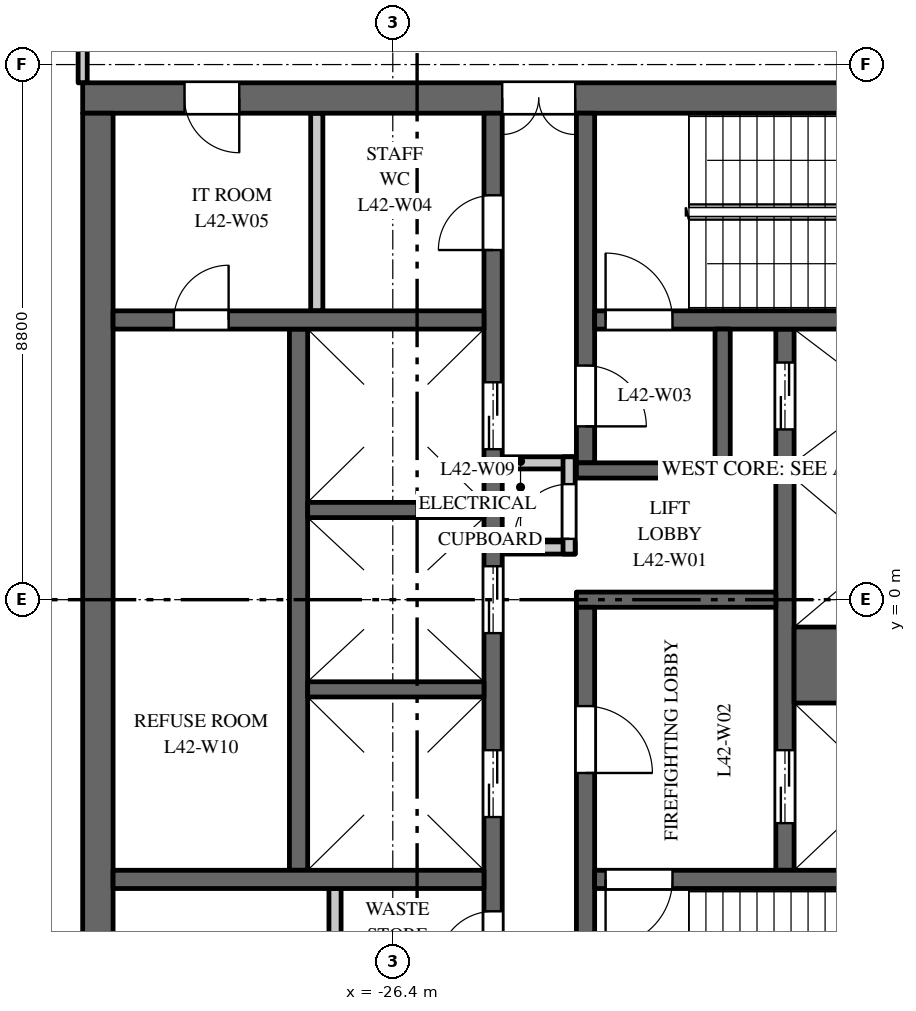
"""IFC4 building model, lengths in metres.
Left out: names, types, materials, properties, quantities, classifications, styles, units other than length and angle.
Written with IfcOpenShell. Run it as: python <this file> out.ifc"""

import sys

from ifc_helpers import new_model, si_unit, direction, frame, frame_2d, origin, place, context, subcontext, project, spatial, rectangle, extrude, element, fill, save


model = new_model("IFC4")
c1 = context("Model", 3, precision=1e-05, world=origin(), true_north=direction((0.0, 1.0)))
c2 = subcontext(c1, "Body", "Model", "MODEL_VIEW")
j1 = project(units=[si_unit("LENGTHUNIT", "METRE"), si_unit("PLANEANGLEUNIT", "RADIAN")], contexts=[c1])
p1 = place(None, origin())
s1 = spatial("IfcSite", under=j1, at=p1, CompositionType="ELEMENT")
p2 = place(p1, origin())
s2 = spatial("IfcBuilding", under=s1, at=p2, CompositionType="ELEMENT")
p3 = place(p2, frame((0.0, 0.0, 182.0)))
s3 = spatial("IfcBuildingStorey", under=s2, at=p3, CompositionType="ELEMENT", Elevation=182.0)
p4 = place(p3, frame((-16.5, 8.25, 0.0), z_axis=(0.0, 0.0, 1.0), x_axis=(-1.0, 0.0, 0.0)))
e1 = element("IfcWall", 1, at=p4, inside=s3, PredefinedType="SHEAR", context=c2, shape_type="SweptSolid", body=[
    extrude(rectangle(XDim=15.0, YDim=0.5, at=frame_2d((7.5, 0.0))), origin(), (0.0, 0.0, 1.0), 3.7),
])
p5 = place(p4, frame((6.9, 0.0, 0.0)))
e2 = element("IfcOpeningElement", 2, at=p5, cuts=e1, PredefinedType="OPENING", context=c2, shape_type="SweptSolid", body=[
    extrude(rectangle(XDim=1.2, YDim=2.1, at=frame_2d((0.6, 1.05))), frame((0.0, 0.26, 0.0), z_axis=(0.0, -1.0, 0.0), x_axis=(1.0, 0.0, 0.0)), (0.0, 0.0, 1.0), 0.52),
])
p6 = place(p4, frame((12.425, 0.0, 0.0)))
e3 = element("IfcOpeningElement", 3, at=p6, cuts=e1, PredefinedType="OPENING", context=c2, shape_type="SweptSolid", body=[
    extrude(rectangle(XDim=0.9, YDim=2.1, at=frame_2d((0.45, 1.05))), frame((0.0, 0.26, 0.0), z_axis=(0.0, -1.0, 0.0), x_axis=(1.0, 0.0, 0.0)), (0.0, 0.0, 1.0), 0.52),
])
p7 = place(p3, frame((-27.95, -4.45, 0.0), z_axis=(0.0, 0.0, 1.0), x_axis=(0.0, 1.0, 0.0)))
e4 = element("IfcWall", 4, at=p7, inside=s3, PredefinedType="SHEAR", context=c2, shape_type="SweptSolid", body=[
    extrude(rectangle(XDim=8.9, YDim=0.3, at=frame_2d((4.45, 0.0))), origin(), (0.0, 0.0, 1.0), 3.7),
])
p8 = place(p3, frame((-19.95, -4.45, 0.0), z_axis=(0.0, 0.0, 1.0), x_axis=(0.0, 1.0, 0.0)))
e5 = element("IfcWall", 5, at=p8, inside=s3, PredefinedType="SHEAR", context=c2, shape_type="SweptSolid", body=[
    extrude(rectangle(XDim=8.9, YDim=0.3, at=frame_2d((4.45, 0.0))), origin(), (0.0, 0.0, 1.0), 3.7),
])
p9 = place(p8, frame((0.775, 0.0, 0.0)))
e6 = element("IfcOpeningElement", 6, at=p9, cuts=e5, PredefinedType="OPENING", context=c2, shape_type="SweptSolid", body=[
    extrude(rectangle(XDim=1.2, YDim=2.1, at=frame_2d((0.6, 1.05))), frame((0.0, 0.16, 0.0), z_axis=(0.0, -1.0, 0.0), x_axis=(1.0, 0.0, 0.0)), (0.0, 0.0, 1.0), 0.32),
])
p10 = place(p8, frame((7.25, 0.0, 0.0)))
e7 = element("IfcOpeningElement", 7, at=p10, cuts=e5, PredefinedType="OPENING", context=c2, shape_type="SweptSolid", body=[
    extrude(rectangle(XDim=1.1, YDim=2.1, at=frame_2d((0.55, 1.05))), frame((0.0, 0.16, 0.0), z_axis=(0.0, -1.0, 0.0), x_axis=(1.0, 0.0, 0.0)), (0.0, 0.0, 1.0), 0.32),
])
p11 = place(p3, frame((-24.75, -8.0, 0.0), z_axis=(0.0, 0.0, 1.0), x_axis=(0.0, 1.0, 0.0)))
e8 = element("IfcWall", 8, at=p11, inside=s3, PredefinedType="SHEAR", context=c2, shape_type="SweptSolid", body=[
    extrude(rectangle(XDim=16.0, YDim=0.3, at=frame_2d((8.0, 0.0))), origin(), (0.0, 0.0, 1.0), 3.7),
])
p12 = place(p11, frame((4.425, 0.0, 0.0)))
e9 = element("IfcOpeningElement", 9, at=p12, cuts=e8, PredefinedType="OPENING", context=c2, shape_type="SweptSolid", body=[
    extrude(rectangle(XDim=1.1, YDim=2.1, at=frame_2d((0.55, 1.05))), frame((0.0, 0.16, 0.0), z_axis=(0.0, -1.0, 0.0), x_axis=(1.0, 0.0, 0.0)), (0.0, 0.0, 1.0), 0.32),
])
p13 = place(p11, frame((7.45, 0.0, 0.0)))
e10 = element("IfcOpeningElement", 10, at=p13, cuts=e8, PredefinedType="OPENING", context=c2, shape_type="SweptSolid", body=[
    extrude(rectangle(XDim=1.1, YDim=2.1, at=frame_2d((0.55, 1.05))), frame((0.0, 0.16, 0.0), z_axis=(0.0, -1.0, 0.0), x_axis=(1.0, 0.0, 0.0)), (0.0, 0.0, 1.0), 0.32),
])
p14 = place(p11, frame((10.475, 0.0, 0.0)))
e11 = element("IfcOpeningElement", 11, at=p14, cuts=e8, PredefinedType="OPENING", context=c2, shape_type="SweptSolid", body=[
    extrude(rectangle(XDim=1.1, YDim=2.1, at=frame_2d((0.55, 1.05))), frame((0.0, 0.16, 0.0), z_axis=(0.0, -1.0, 0.0), x_axis=(1.0, 0.0, 0.0)), (0.0, 0.0, 1.0), 0.32),
])
p15 = place(p11, frame((13.75, 0.0, 0.0)))
e12 = element("IfcOpeningElement", 12, at=p15, cuts=e8, PredefinedType="OPENING", context=c2, shape_type="SweptSolid", body=[
    extrude(rectangle(XDim=0.9, YDim=2.1, at=frame_2d((0.45, 1.05))), frame((0.0, 0.16, 0.0), z_axis=(0.0, -1.0, 0.0), x_axis=(1.0, 0.0, 0.0)), (0.0, 0.0, 1.0), 0.32),
])
p16 = place(p11, frame((1.975, 0.0, 0.0)))
e13 = element("IfcOpeningElement", 13, at=p16, cuts=e8, PredefinedType="OPENING", context=c2, shape_type="SweptSolid", body=[
    extrude(rectangle(XDim=0.9, YDim=2.1, at=frame_2d((0.45, 1.05))), frame((0.0, 0.16, 0.0), z_axis=(0.0, -1.0, 0.0), x_axis=(1.0, 0.0, 0.0)), (0.0, 0.0, 1.0), 0.32),
])
p17 = place(p11, frame((0.35, 0.0, 0.0)))
e14 = element("IfcOpeningElement", 14, at=p17, cuts=e8, PredefinedType="OPENING", context=c2, shape_type="SweptSolid", body=[
    extrude(rectangle(XDim=0.9, YDim=2.1, at=frame_2d((0.45, 1.05))), frame((0.0, 0.16, 0.0), z_axis=(0.0, -1.0, 0.0), x_axis=(1.0, 0.0, 0.0)), (0.0, 0.0, 1.0), 0.32),
])
p18 = place(p3, frame((-20.1, 0.0, 0.0), z_axis=(0.0, 0.0, 1.0), x_axis=(-1.0, 0.0, 0.0)))
e15 = element("IfcWall", 15, at=p18, inside=s3, PredefinedType="SHEAR", context=c2, shape_type="SweptSolid", body=[
    extrude(rectangle(XDim=3.28, YDim=0.25, at=frame_2d((1.64, 0.0))), origin(), (0.0, 0.0, 1.0), 3.7),
])
for number, where, z_axis, x_axis in (
    (16, (-23.4, 0.85, 0.0), (0.0, 0.0, 1.0), (-1.0, 0.0, 0.0)),
    (17, (-23.4, 2.25, 0.0), (0.0, 0.0, 1.0), (-1.0, 0.0, 0.0)),
):
    element("IfcWall", number, at=place(p3, frame(where, z_axis=z_axis, x_axis=x_axis)), inside=s3, PredefinedType="PARTITIONING", context=c2, shape_type="SweptSolid", body=[
        extrude(rectangle(XDim=1.2, YDim=0.2, at=frame_2d((0.6, 0.0))), origin(), (0.0, 0.0, 1.0), 3.7),
    ])
p19 = place(p3, frame((-23.5, 0.75, 0.0), z_axis=(0.0, 0.0, 1.0), x_axis=(0.0, 1.0, 0.0)))
e18 = element("IfcWall", 18, at=p19, inside=s3, PredefinedType="PARTITIONING", context=c2, shape_type="SweptSolid", body=[
    extrude(rectangle(XDim=1.6, YDim=0.2, at=frame_2d((0.8, 0.0))), origin(), (0.0, 0.0, 1.0), 3.7),
])
p20 = place(p19, frame((0.25, 0.0, 0.0)))
e19 = element("IfcOpeningElement", 19, at=p20, cuts=e18, PredefinedType="OPENING", context=c2, shape_type="SweptSolid", body=[
    extrude(rectangle(XDim=0.9, YDim=2.1, at=frame_2d((0.45, 1.05))), frame((0.0, 0.11, 0.0), z_axis=(0.0, -1.0, 0.0), x_axis=(1.0, 0.0, 0.0)), (0.0, 0.0, 1.0), 0.22),
])
p21 = place(p3, frame((-31.25, -8.0, 0.0), z_axis=(0.0, 0.0, 1.0), x_axis=(0.0, 1.0, 0.0)))
e20 = element("IfcWall", 20, at=p21, inside=s3, PredefinedType="SHEAR", context=c2, shape_type="SweptSolid", body=[
    extrude(rectangle(XDim=16.0, YDim=0.5, at=frame_2d((8.0, 0.0))), origin(), (0.0, 0.0, 1.0), 3.7),
])
p22 = place(p3, frame((-24.9, 4.6, 0.0), z_axis=(0.0, 0.0, 1.0), x_axis=(-1.0, 0.0, 0.0)))
e21 = element("IfcWall", 21, at=p22, inside=s3, PredefinedType="SHEAR", context=c2, shape_type="SweptSolid", body=[
    extrude(rectangle(XDim=6.1, YDim=0.3, at=frame_2d((3.05, 0.0))), origin(), (0.0, 0.0, 1.0), 3.7),
])
p23 = place(p22, frame((4.2, 0.0, 0.0)))
e22 = element("IfcOpeningElement", 22, at=p23, cuts=e21, PredefinedType="OPENING", context=c2, shape_type="SweptSolid", body=[
    extrude(rectangle(XDim=0.9, YDim=2.1, at=frame_2d((0.45, 1.05))), frame((0.0, 0.16, 0.0), z_axis=(0.0, -1.0, 0.0), x_axis=(1.0, 0.0, 0.0)), (0.0, 0.0, 1.0), 0.32),
])
for number, where, z_axis, x_axis in (
    (23, (-27.65, 4.75, 0.0), (0.0, 0.0, 1.0), (0.0, 1.0, 0.0)),
    (24, (-27.35, -8.0, 0.0), (0.0, 0.0, 1.0), (0.0, 1.0, 0.0)),
):
    element("IfcWall", number, at=place(p3, frame(where, z_axis=z_axis, x_axis=x_axis)), inside=s3, PredefinedType="PARTITIONING", context=c2, shape_type="SweptSolid", body=[
        extrude(rectangle(XDim=3.25, YDim=0.2, at=frame_2d((1.625, 0.0))), origin(), (0.0, 0.0, 1.0), 3.7),
    ])
p24 = place(p3, frame((-24.9, -4.6, 0.0), z_axis=(0.0, 0.0, 1.0), x_axis=(-1.0, 0.0, 0.0)))
e25 = element("IfcWall", 25, at=p24, inside=s3, PredefinedType="SHEAR", context=c2, shape_type="SweptSolid", body=[
    extrude(rectangle(XDim=6.1, YDim=0.3, at=frame_2d((3.05, 0.0))), origin(), (0.0, 0.0, 1.0), 3.7),
])
p25 = place(p3, frame((-16.9, -1.075, 0.0), z_axis=(0.0, 0.0, 1.0), x_axis=(-1.0, 0.0, 0.0)))
e26 = element("IfcWall", 26, at=p25, inside=s3, PredefinedType="SHEAR", context=c2, shape_type="SweptSolid", body=[
    extrude(rectangle(XDim=2.9, YDim=1.25, at=frame_2d((1.45, 0.0))), origin(), (0.0, 0.0, 1.0), 3.7),
])
for number, where, z_axis, x_axis in (
    (27, (-16.9, 2.125, 0.0), (0.0, 0.0, 1.0), (-1.0, 0.0, 0.0)),
    (28, (-24.9, -1.475, 0.0), (0.0, 0.0, 1.0), (-1.0, 0.0, 0.0)),
    (29, (-24.9, 1.475, 0.0), (0.0, 0.0, 1.0), (-1.0, 0.0, 0.0)),
):
    element("IfcWall", number, at=place(p3, frame(where, z_axis=z_axis, x_axis=x_axis)), inside=s3, PredefinedType="SHEAR", context=c2, shape_type="SweptSolid", body=[
        extrude(rectangle(XDim=2.9, YDim=0.25, at=frame_2d((1.45, 0.0))), origin(), (0.0, 0.0, 1.0), 3.7),
    ])
p26 = place(p3, frame((-23.23, 2.25, 0.0), z_axis=(0.0, 0.0, 1.0), x_axis=(0.0, 1.0, 0.0)))
e30 = element("IfcWall", 30, at=p26, inside=s3, PredefinedType="SHEAR", context=c2, shape_type="SweptSolid", body=[
    extrude(rectangle(XDim=5.75, YDim=0.3, at=frame_2d((2.875, 0.0))), origin(), (0.0, 0.0, 1.0), 3.7),
])
p27 = place(p26, frame((0.6, 0.0, 0.0)))
e31 = element("IfcOpeningElement", 31, at=p27, cuts=e30, PredefinedType="OPENING", context=c2, shape_type="SweptSolid", body=[
    extrude(rectangle(XDim=1.0, YDim=2.1, at=frame_2d((0.5, 1.05))), frame((0.0, 0.16, 0.0), z_axis=(0.0, -1.0, 0.0), x_axis=(1.0, 0.0, 0.0)), (0.0, 0.0, 1.0), 0.32),
])
p28 = place(p3, frame((-23.23, -8.0, 0.0), z_axis=(0.0, 0.0, 1.0), x_axis=(0.0, 1.0, 0.0)))
e32 = element("IfcWall", 32, at=p28, inside=s3, PredefinedType="SHEAR", context=c2, shape_type="SweptSolid", body=[
    extrude(rectangle(XDim=7.875, YDim=0.3, at=frame_2d((3.938, 0.0))), origin(), (0.0, 0.0, 1.0), 3.7),
])
p29 = place(p28, frame((5.15, 0.0, 0.0)))
e33 = element("IfcOpeningElement", 33, at=p29, cuts=e32, PredefinedType="OPENING", context=c2, shape_type="SweptSolid", body=[
    extrude(rectangle(XDim=1.1, YDim=2.1, at=frame_2d((0.55, 1.05))), frame((0.0, 0.16, 0.0), z_axis=(0.0, -1.0, 0.0), x_axis=(1.0, 0.0, 0.0)), (0.0, 0.0, 1.0), 0.32),
])
p30 = place(p3, frame((-16.9, 4.6, 0.0), z_axis=(0.0, 0.0, 1.0), x_axis=(-1.0, 0.0, 0.0)))
e34 = element("IfcWall", 34, at=p30, inside=s3, PredefinedType="SHEAR", context=c2, shape_type="SweptSolid", body=[
    extrude(rectangle(XDim=6.18, YDim=0.3, at=frame_2d((3.09, 0.0))), origin(), (0.0, 0.0, 1.0), 3.7),
])
p31 = place(p30, frame((4.9, 0.0, 0.0)))
e35 = element("IfcOpeningElement", 35, at=p31, cuts=e34, PredefinedType="OPENING", context=c2, shape_type="SweptSolid", body=[
    extrude(rectangle(XDim=1.1, YDim=2.1, at=frame_2d((0.55, 1.05))), frame((0.0, 0.16, 0.0), z_axis=(0.0, -1.0, 0.0), x_axis=(1.0, 0.0, 0.0)), (0.0, 0.0, 1.0), 0.32),
])
p32 = place(p3, frame((-16.9, -4.6, 0.0), z_axis=(0.0, 0.0, 1.0), x_axis=(-1.0, 0.0, 0.0)))
e36 = element("IfcWall", 36, at=p32, inside=s3, PredefinedType="SHEAR", context=c2, shape_type="SweptSolid", body=[
    extrude(rectangle(XDim=6.18, YDim=0.3, at=frame_2d((3.09, 0.0))), origin(), (0.0, 0.0, 1.0), 3.7),
])
p33 = place(p32, frame((4.9, 0.0, 0.0)))
e37 = element("IfcOpeningElement", 37, at=p33, cuts=e36, PredefinedType="OPENING", context=c2, shape_type="SweptSolid", body=[
    extrude(rectangle(XDim=1.1, YDim=2.1, at=frame_2d((0.55, 1.05))), frame((0.0, 0.16, 0.0), z_axis=(0.0, -1.0, 0.0), x_axis=(1.0, 0.0, 0.0)), (0.0, 0.0, 1.0), 0.32),
])
p34 = place(p3, frame((-20.85, 2.125, 0.0), z_axis=(0.0, 0.0, 1.0), x_axis=(-1.0, 0.0, 0.0)))
e38 = element("IfcWall", 38, at=p34, inside=s3, PredefinedType="SHEAR", context=c2, shape_type="SweptSolid", body=[
    extrude(rectangle(XDim=2.53, YDim=0.25, at=frame_2d((1.265, 0.0))), origin(), (0.0, 0.0, 1.0), 3.7),
])
p35 = place(p3, frame((-20.975, 2.25, 0.0), z_axis=(0.0, 0.0, 1.0), x_axis=(0.0, 1.0, 0.0)))
e39 = element("IfcWall", 39, at=p35, inside=s3, PredefinedType="SHEAR", context=c2, shape_type="SweptSolid", body=[
    extrude(rectangle(XDim=2.2, YDim=0.25, at=frame_2d((1.1, 0.0))), origin(), (0.0, 0.0, 1.0), 3.7),
])
p36 = place(p3, frame((-31.5, 8.5, 0.0), z_axis=(0.0, 0.0, 1.0), x_axis=(0.0, 1.0, 0.0)))
e40 = element("IfcWall", 40, at=p36, inside=s3, PredefinedType="PARTITIONING", context=c2, shape_type="SweptSolid", body=[
    extrude(rectangle(XDim=2.2, YDim=0.15, at=frame_2d((1.1, 0.0))), origin(), (0.0, 0.0, 1.0), 3.7),
])
p37 = place(p9, origin())
e41 = element("IfcDoor", 41, at=p37, inside=s3, OperationType="DOUBLE_DOOR_SLIDING", PredefinedType="DOOR", context=c2, shape_type="SweptSolid", body=[
    extrude(rectangle(XDim=1.2, YDim=2.1, at=frame_2d((0.6, 1.05))), frame((0.0, 0.025, 0.0), z_axis=(0.0, -1.0, 0.0), x_axis=(1.0, 0.0, 0.0)), (0.0, 0.0, 1.0), 0.05),
])
fill(e6, e41)
p38 = place(p10, origin())
e42 = element("IfcDoor", 42, at=p38, inside=s3, OperationType="DOUBLE_DOOR_SLIDING", PredefinedType="DOOR", context=c2, shape_type="SweptSolid", body=[
    extrude(rectangle(XDim=1.1, YDim=2.1, at=frame_2d((0.55, 1.05))), frame((0.0, 0.025, 0.0), z_axis=(0.0, -1.0, 0.0), x_axis=(1.0, 0.0, 0.0)), (0.0, 0.0, 1.0), 0.05),
])
fill(e7, e42)
p39 = place(p12, origin())
e43 = element("IfcDoor", 43, at=p39, inside=s3, OperationType="DOUBLE_DOOR_SLIDING", PredefinedType="DOOR", context=c2, shape_type="SweptSolid", body=[
    extrude(rectangle(XDim=1.1, YDim=2.1, at=frame_2d((0.55, 1.05))), frame((0.0, 0.025, 0.0), z_axis=(0.0, -1.0, 0.0), x_axis=(1.0, 0.0, 0.0)), (0.0, 0.0, 1.0), 0.05),
])
fill(e9, e43)
p40 = place(p13, origin())
e44 = element("IfcDoor", 44, at=p40, inside=s3, OperationType="DOUBLE_DOOR_SLIDING", PredefinedType="DOOR", context=c2, shape_type="SweptSolid", body=[
    extrude(rectangle(XDim=1.1, YDim=2.1, at=frame_2d((0.55, 1.05))), frame((0.0, 0.025, 0.0), z_axis=(0.0, -1.0, 0.0), x_axis=(1.0, 0.0, 0.0)), (0.0, 0.0, 1.0), 0.05),
])
fill(e10, e44)
p41 = place(p14, origin())
e45 = element("IfcDoor", 45, at=p41, inside=s3, OperationType="DOUBLE_DOOR_SLIDING", PredefinedType="DOOR", context=c2, shape_type="SweptSolid", body=[
    extrude(rectangle(XDim=1.1, YDim=2.1, at=frame_2d((0.55, 1.05))), frame((0.0, 0.025, 0.0), z_axis=(0.0, -1.0, 0.0), x_axis=(1.0, 0.0, 0.0)), (0.0, 0.0, 1.0), 0.05),
])
fill(e11, e45)
p42 = place(p31, origin())
e46 = element("IfcDoor", 46, at=p42, inside=s3, OperationType="SINGLE_SWING_RIGHT", PredefinedType="DOOR", context=c2, shape_type="SweptSolid", body=[
    extrude(rectangle(XDim=1.1, YDim=2.1, at=frame_2d((0.55, 1.05))), frame((0.0, 0.025, 0.0), z_axis=(0.0, -1.0, 0.0), x_axis=(1.0, 0.0, 0.0)), (0.0, 0.0, 1.0), 0.05),
])
fill(e35, e46)
p43 = place(p33, origin())
e47 = element("IfcDoor", 47, at=p43, inside=s3, OperationType="SINGLE_SWING_LEFT", PredefinedType="DOOR", context=c2, shape_type="SweptSolid", body=[
    extrude(rectangle(XDim=1.1, YDim=2.1, at=frame_2d((0.55, 1.05))), frame((0.0, 0.025, 0.0), z_axis=(0.0, -1.0, 0.0), x_axis=(1.0, 0.0, 0.0)), (0.0, 0.0, 1.0), 0.05),
])
fill(e37, e47)
p44 = place(p29, origin())
e48 = element("IfcDoor", 48, at=p44, inside=s3, OperationType="SINGLE_SWING_LEFT", PredefinedType="DOOR", context=c2, shape_type="SweptSolid", body=[
    extrude(rectangle(XDim=1.1, YDim=2.1, at=frame_2d((0.55, 1.05))), frame((0.0, 0.025, 0.0), z_axis=(0.0, -1.0, 0.0), x_axis=(1.0, 0.0, 0.0)), (0.0, 0.0, 1.0), 0.05),
])
fill(e33, e48)
p45 = place(p27, origin())
e49 = element("IfcDoor", 49, at=p45, inside=s3, OperationType="SINGLE_SWING_LEFT", PredefinedType="DOOR", context=c2, shape_type="SweptSolid", body=[
    extrude(rectangle(XDim=1.0, YDim=2.1, at=frame_2d((0.5, 1.05))), frame((0.0, 0.025, 0.0), z_axis=(0.0, -1.0, 0.0), x_axis=(1.0, 0.0, 0.0)), (0.0, 0.0, 1.0), 0.05),
])
fill(e31, e49)
p46 = place(p5, origin())
e50 = element("IfcDoor", 50, at=p46, inside=s3, OperationType="DOUBLE_DOOR_DOUBLE_SWING", PredefinedType="DOOR", context=c2, shape_type="SweptSolid", body=[
    extrude(rectangle(XDim=1.2, YDim=2.1, at=frame_2d((0.6, 1.05))), frame((0.0, 0.025, 0.0), z_axis=(0.0, -1.0, 0.0), x_axis=(1.0, 0.0, 0.0)), (0.0, 0.0, 1.0), 0.05),
])
fill(e2, e50)
p47 = place(p15, origin())
e51 = element("IfcDoor", 51, at=p47, inside=s3, OperationType="SINGLE_SWING_RIGHT", PredefinedType="DOOR", context=c2, shape_type="SweptSolid", body=[
    extrude(rectangle(XDim=0.9, YDim=2.1, at=frame_2d((0.45, 1.05))), frame((0.0, 0.025, 0.0), z_axis=(0.0, -1.0, 0.0), x_axis=(1.0, 0.0, 0.0)), (0.0, 0.0, 1.0), 0.05),
])
fill(e12, e51)
p48 = place(p6, origin())
e52 = element("IfcDoor", 52, at=p48, inside=s3, OperationType="SINGLE_SWING_RIGHT", PredefinedType="DOOR", context=c2, shape_type="SweptSolid", body=[
    extrude(rectangle(XDim=0.9, YDim=2.1, at=frame_2d((0.45, 1.05))), frame((0.0, 0.025, 0.0), z_axis=(0.0, -1.0, 0.0), x_axis=(1.0, 0.0, 0.0)), (0.0, 0.0, 1.0), 0.05),
])
fill(e3, e52)
p49 = place(p16, origin())
e53 = element("IfcDoor", 53, at=p49, inside=s3, OperationType="SINGLE_SWING_RIGHT", PredefinedType="DOOR", context=c2, shape_type="SweptSolid", body=[
    extrude(rectangle(XDim=0.9, YDim=2.1, at=frame_2d((0.45, 1.05))), frame((0.0, 0.025, 0.0), z_axis=(0.0, -1.0, 0.0), x_axis=(1.0, 0.0, 0.0)), (0.0, 0.0, 1.0), 0.05),
])
fill(e13, e53)
p50 = place(p20, origin())
e54 = element("IfcDoor", 54, at=p50, inside=s3, OperationType="SINGLE_SWING_RIGHT", PredefinedType="DOOR", context=c2, shape_type="SweptSolid", body=[
    extrude(rectangle(XDim=0.9, YDim=2.1, at=frame_2d((0.45, 1.05))), frame((0.0, 0.025, 0.0), z_axis=(0.0, -1.0, 0.0), x_axis=(1.0, 0.0, 0.0)), (0.0, 0.0, 1.0), 0.05),
])
fill(e19, e54)
p51 = place(p23, origin())
e55 = element("IfcDoor", 55, at=p51, inside=s3, OperationType="SINGLE_SWING_LEFT", PredefinedType="DOOR", context=c2, shape_type="SweptSolid", body=[
    extrude(rectangle(XDim=0.9, YDim=2.1, at=frame_2d((0.45, 1.05))), frame((0.0, 0.025, 0.0), z_axis=(0.0, -1.0, 0.0), x_axis=(1.0, 0.0, 0.0)), (0.0, 0.0, 1.0), 0.05),
])
fill(e22, e55)
save(model, sys.argv[1])
